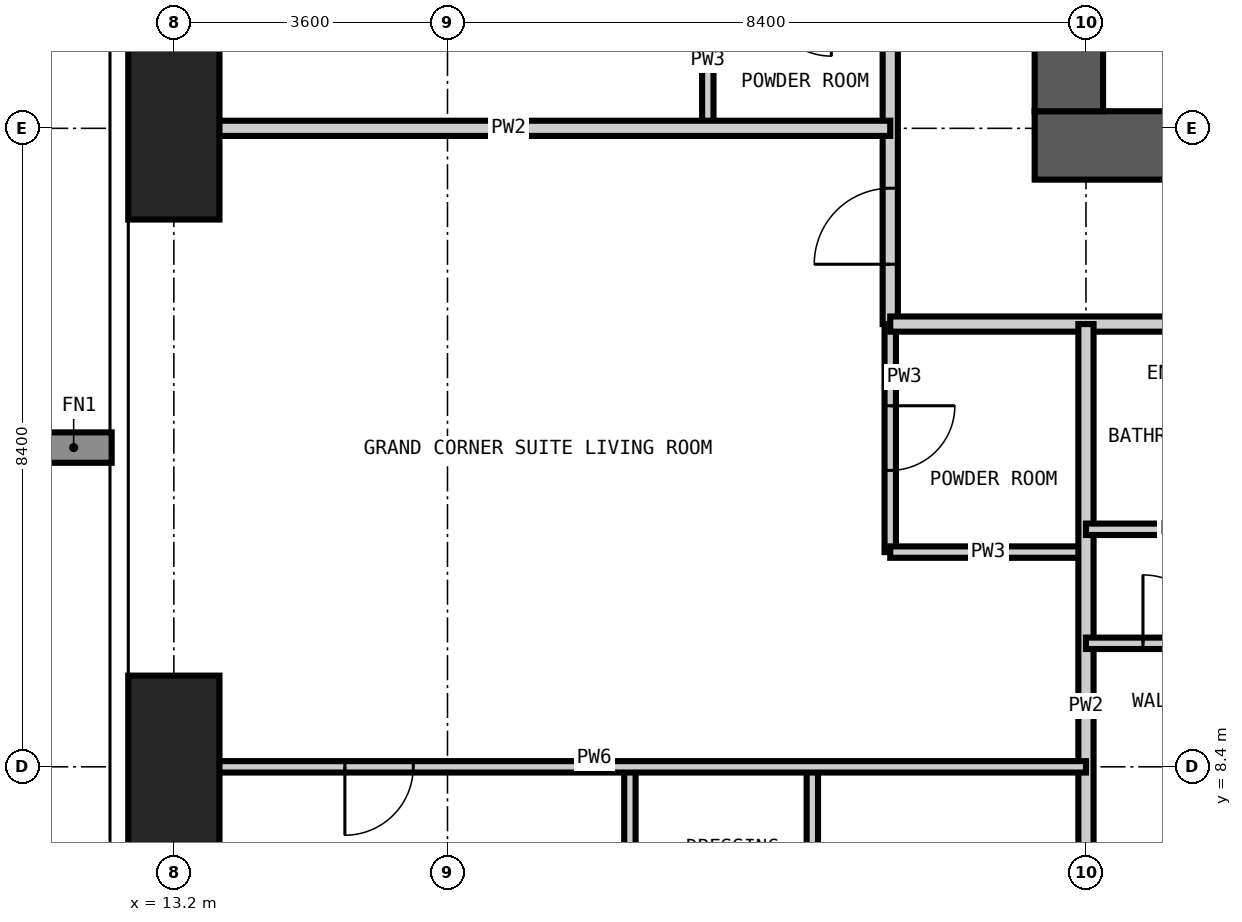
"""IFC4 building model, lengths in metres.
Left out: names, types, materials, properties, quantities, classifications, styles, units other than length and angle.
Written with IfcOpenShell. Run it as: python <this file> out.ifc"""

import sys

from ifc_helpers import new_model, si_unit, direction, frame, frame_2d, origin, origin_2d, place, context, subcontext, project, spatial, rectangle, extrude, element, fill, save


model = new_model("IFC4")
c1 = context("Model", 3, precision=1e-05, world=origin(), true_north=direction((0.0, 1.0)))
c2 = subcontext(c1, "Body", "Model", "MODEL_VIEW")
j1 = project(units=[si_unit("LENGTHUNIT", "METRE"), si_unit("PLANEANGLEUNIT", "RADIAN")], contexts=[c1])
p1 = place(None, origin())
s1 = spatial("IfcSite", under=j1, at=p1, CompositionType="ELEMENT")
p2 = place(p1, origin())
s2 = spatial("IfcBuilding", under=s1, at=p2, CompositionType="ELEMENT")
p3 = place(p2, frame((0.0, 0.0, 233.4)))
s3 = spatial("IfcBuildingStorey", under=s2, at=p3, CompositionType="ELEMENT", Elevation=233.4)
for number, where, z_axis, x_axis in (
    (1, (13.2, 8.4, -0.35), (0.0, 0.0, 1.0), (1.0, 0.0, 0.0)),
    (2, (13.2, 16.8, -0.35), (0.0, 0.0, 1.0), (1.0, 0.0, 0.0)),
):
    element("IfcColumn", number, at=place(p3, frame(where, z_axis=z_axis, x_axis=x_axis)), inside=s3, PredefinedType="COLUMN", context=c2, shape_type="SweptSolid", body=[
        extrude(rectangle(XDim=1.2, YDim=2.4, at=origin_2d()), origin(), (0.0, 0.0, 1.0), 3.9),
    ])
p4 = place(p3, frame((24.525, 16.575, -0.35), z_axis=(0.0, 0.0, 1.0), x_axis=(1.0, 0.0, 0.0)))
e3 = element("IfcWall", 3, at=p4, inside=s3, PredefinedType="SHEAR", context=c2, shape_type="SweptSolid", body=[
    extrude(rectangle(XDim=18.15, YDim=0.9, at=frame_2d((9.075, 0.0))), origin(), (0.0, 0.0, 1.0), 3.9),
])
p5 = place(p4, frame((4.375, 0.0, 0.35)))
e4 = element("IfcOpeningElement", 4, at=p5, cuts=e3, PredefinedType="OPENING", context=c2, shape_type="SweptSolid", body=[
    extrude(rectangle(XDim=1.0, YDim=2.1, at=frame_2d((0.5, 1.05))), frame((0.0, 0.46, 0.0), z_axis=(0.0, -1.0, 0.0), x_axis=(1.0, 0.0, 0.0)), (0.0, 0.0, 1.0), 0.92),
])
p6 = place(p4, frame((10.675, 0.0, 0.35)))
e5 = element("IfcOpeningElement", 5, at=p6, cuts=e3, PredefinedType="OPENING", context=c2, shape_type="SweptSolid", body=[
    extrude(rectangle(XDim=1.0, YDim=2.1, at=frame_2d((0.5, 1.05))), frame((0.0, 0.46, 0.0), z_axis=(0.0, -1.0, 0.0), x_axis=(1.0, 0.0, 0.0)), (0.0, 0.0, 1.0), 0.92),
])
p7 = place(p3, frame((24.975, 41.775, -0.35), z_axis=(0.0, 0.0, 1.0), x_axis=(0.0, -1.0, 0.0)))
e6 = element("IfcWall", 6, at=p7, inside=s3, PredefinedType="SHEAR", context=c2, shape_type="SweptSolid", body=[
    extrude(rectangle(XDim=24.75, YDim=0.9, at=frame_2d((12.375, 0.0))), origin(), (0.0, 0.0, 1.0), 3.9),
])
p8 = place(p7, frame((11.875, 0.0, 0.35)))
e7 = element("IfcOpeningElement", 7, at=p8, cuts=e6, PredefinedType="OPENING", context=c2, shape_type="SweptSolid", body=[
    extrude(rectangle(XDim=1.0, YDim=2.1, at=frame_2d((0.5, 1.05))), frame((0.0, 0.46, 0.0), z_axis=(0.0, -1.0, 0.0), x_axis=(1.0, 0.0, 0.0)), (0.0, 0.0, 1.0), 0.92),
])
p9 = place(p3, frame((20.225, 16.8, 0.0), z_axis=(0.0, 0.0, 1.0), x_axis=(0.0, 1.0, 0.0)))
e8 = element("IfcWall", 8, at=p9, inside=s3, PredefinedType="PARTITIONING", context=c2, shape_type="SweptSolid", body=[
    extrude(rectangle(XDim=1.8, YDim=0.15, at=frame_2d((0.9, 0.0))), origin(), (0.0, 0.0, 1.0), 3.55),
])
p10 = place(p3, frame((22.625, 11.225, 0.0), z_axis=(0.0, 0.0, 1.0), x_axis=(0.0, 1.0, 0.0)))
e9 = element("IfcWall", 9, at=p10, inside=s3, PredefinedType="PARTITIONING", context=c2, shape_type="SweptSolid", body=[
    extrude(rectangle(XDim=3.0, YDim=0.15, at=frame_2d((1.5, 0.0))), origin(), (0.0, 0.0, 1.0), 3.55),
])
p11 = place(p10, frame((1.075, 0.0, 0.0)))
e10 = element("IfcOpeningElement", 10, at=p11, cuts=e9, PredefinedType="OPENING", context=c2, shape_type="SweptSolid", body=[
    extrude(rectangle(XDim=0.85, YDim=2.1, at=frame_2d((0.425, 1.05))), frame((0.0, 0.085, 0.0), z_axis=(0.0, -1.0, 0.0), x_axis=(1.0, 0.0, 0.0)), (0.0, 0.0, 1.0), 0.17),
])
p12 = place(p3, frame((22.625, 11.225, 0.0), z_axis=(0.0, 0.0, 1.0), x_axis=(1.0, 0.0, 0.0)))
e11 = element("IfcWall", 11, at=p12, inside=s3, PredefinedType="PARTITIONING", context=c2, shape_type="SweptSolid", body=[
    extrude(rectangle(XDim=2.575, YDim=0.15, at=frame_2d((1.288, 0.0))), origin(), (0.0, 0.0, 1.0), 3.55),
])
p13 = place(p3, frame((22.625, 14.225, 0.0), z_axis=(0.0, 0.0, 1.0), x_axis=(0.0, 1.0, 0.0)))
e12 = element("IfcWall", 12, at=p13, inside=s3, PredefinedType="PARTITIONING", context=c2, shape_type="SweptSolid", body=[
    extrude(rectangle(XDim=30.95, YDim=0.2, at=frame_2d((15.475, 0.0))), origin(), (0.0, 0.0, 1.0), 3.55),
])
p14 = place(p13, frame((5.075, 0.0, 0.0)))
e13 = element("IfcOpeningElement", 13, at=p14, cuts=e12, PredefinedType="OPENING", context=c2, shape_type="SweptSolid", body=[
    extrude(rectangle(XDim=1.0, YDim=2.2, at=frame_2d((0.5, 1.1))), frame((0.0, 0.11, 0.0), z_axis=(0.0, -1.0, 0.0), x_axis=(1.0, 0.0, 0.0)), (0.0, 0.0, 1.0), 0.22),
])
p15 = place(p13, frame((13.475, 0.0, 0.0)))
e14 = element("IfcOpeningElement", 14, at=p15, cuts=e12, PredefinedType="OPENING", context=c2, shape_type="SweptSolid", body=[
    extrude(rectangle(XDim=1.0, YDim=2.2, at=frame_2d((0.5, 1.1))), frame((0.0, 0.11, 0.0), z_axis=(0.0, -1.0, 0.0), x_axis=(1.0, 0.0, 0.0)), (0.0, 0.0, 1.0), 0.22),
])
p16 = place(p13, frame((21.875, 0.0, 0.0)))
e15 = element("IfcOpeningElement", 15, at=p16, cuts=e12, PredefinedType="OPENING", context=c2, shape_type="SweptSolid", body=[
    extrude(rectangle(XDim=1.0, YDim=2.2, at=frame_2d((0.5, 1.1))), frame((0.0, 0.11, 0.0), z_axis=(0.0, -1.0, 0.0), x_axis=(1.0, 0.0, 0.0)), (0.0, 0.0, 1.0), 0.22),
])
p17 = place(p13, frame((0.787, 0.0, 0.0)))
e16 = element("IfcOpeningElement", 16, at=p17, cuts=e12, PredefinedType="OPENING", context=c2, shape_type="SweptSolid", body=[
    extrude(rectangle(XDim=1.0, YDim=2.2, at=frame_2d((0.5, 1.1))), frame((0.0, 0.11, 0.0), z_axis=(0.0, -1.0, 0.0), x_axis=(1.0, 0.0, 0.0)), (0.0, 0.0, 1.0), 0.22),
])
p18 = place(p13, frame((28.862, 0.0, 0.0)))
e17 = element("IfcOpeningElement", 17, at=p18, cuts=e12, PredefinedType="OPENING", context=c2, shape_type="SweptSolid", body=[
    extrude(rectangle(XDim=1.0, YDim=2.2, at=frame_2d((0.5, 1.1))), frame((0.0, 0.11, 0.0), z_axis=(0.0, -1.0, 0.0), x_axis=(1.0, 0.0, 0.0)), (0.0, 0.0, 1.0), 0.22),
])
p19 = place(p3, frame((44.875, 14.225, 0.0), z_axis=(0.0, 0.0, 1.0), x_axis=(-1.0, 0.0, 0.0)))
e18 = element("IfcWall", 18, at=p19, inside=s3, PredefinedType="PARTITIONING", context=c2, shape_type="SweptSolid", body=[
    extrude(rectangle(XDim=22.25, YDim=0.2, at=frame_2d((11.125, 0.0))), origin(), (0.0, 0.0, 1.0), 3.55),
])
p20 = place(p19, frame((15.875, 0.0, 0.0)))
e19 = element("IfcOpeningElement", 19, at=p20, cuts=e18, PredefinedType="OPENING", context=c2, shape_type="SweptSolid", body=[
    extrude(rectangle(XDim=1.0, YDim=2.2, at=frame_2d((0.5, 1.1))), frame((0.0, 0.11, 0.0), z_axis=(0.0, -1.0, 0.0), x_axis=(1.0, 0.0, 0.0)), (0.0, 0.0, 1.0), 0.22),
])
p21 = place(p19, frame((9.425, 0.0, 0.0)))
e20 = element("IfcOpeningElement", 20, at=p21, cuts=e18, PredefinedType="OPENING", context=c2, shape_type="SweptSolid", body=[
    extrude(rectangle(XDim=1.0, YDim=2.2, at=frame_2d((0.5, 1.1))), frame((0.0, 0.11, 0.0), z_axis=(0.0, -1.0, 0.0), x_axis=(1.0, 0.0, 0.0)), (0.0, 0.0, 1.0), 0.22),
])
p22 = place(p19, frame((5.675, 0.0, 0.0)))
e21 = element("IfcOpeningElement", 21, at=p22, cuts=e18, PredefinedType="OPENING", context=c2, shape_type="SweptSolid", body=[
    extrude(rectangle(XDim=1.0, YDim=2.2, at=frame_2d((0.5, 1.1))), frame((0.0, 0.11, 0.0), z_axis=(0.0, -1.0, 0.0), x_axis=(1.0, 0.0, 0.0)), (0.0, 0.0, 1.0), 0.22),
])
p23 = place(p3, frame((25.2, 4.182, 0.0), z_axis=(0.0, 0.0, 1.0), x_axis=(0.0, 1.0, 0.0)))
e22 = element("IfcWall", 22, at=p23, inside=s3, PredefinedType="PARTITIONING", context=c2, shape_type="SweptSolid", body=[
    extrude(rectangle(XDim=10.043, YDim=0.2, at=frame_2d((5.021, 0.0))), origin(), (0.0, 0.0, 1.0), 3.55),
])
p24 = place(p3, frame((12.582, 16.8, 0.0), z_axis=(0.0, 0.0, 1.0), x_axis=(1.0, 0.0, 0.0)))
e23 = element("IfcWall", 23, at=p24, inside=s3, PredefinedType="PARTITIONING", context=c2, shape_type="SweptSolid", body=[
    extrude(rectangle(XDim=10.043, YDim=0.2, at=frame_2d((5.021, 0.0))), origin(), (0.0, 0.0, 1.0), 3.55),
])
p25 = place(p3, frame((19.2, 5.4, 0.0), z_axis=(0.0, 0.0, 1.0), x_axis=(0.0, 1.0, 0.0)))
e24 = element("IfcWall", 24, at=p25, inside=s3, PredefinedType="PARTITIONING", context=c2, shape_type="SweptSolid", body=[
    extrude(rectangle(XDim=3.0, YDim=0.15, at=frame_2d((1.5, 0.0))), origin(), (0.0, 0.0, 1.0), 3.55),
])
p26 = place(p25, frame((1.05, 0.0, 0.0)))
e25 = element("IfcOpeningElement", 25, at=p26, cuts=e24, PredefinedType="OPENING", context=c2, shape_type="SweptSolid", body=[
    extrude(rectangle(XDim=0.9, YDim=2.1, at=frame_2d((0.45, 1.05))), frame((0.0, 0.085, 0.0), z_axis=(0.0, -1.0, 0.0), x_axis=(1.0, 0.0, 0.0)), (0.0, 0.0, 1.0), 0.17),
])
p27 = place(p3, frame((21.6, 5.4, 0.0), z_axis=(0.0, 0.0, 1.0), x_axis=(0.0, 1.0, 0.0)))
e26 = element("IfcWall", 26, at=p27, inside=s3, PredefinedType="PARTITIONING", context=c2, shape_type="SweptSolid", body=[
    extrude(rectangle(XDim=3.0, YDim=0.15, at=frame_2d((1.5, 0.0))), origin(), (0.0, 0.0, 1.0), 3.55),
])
p28 = place(p3, frame((12.582, 8.4, 0.0), z_axis=(0.0, 0.0, 1.0), x_axis=(1.0, 0.0, 0.0)))
e27 = element("IfcWall", 27, at=p28, inside=s3, PredefinedType="PARTITIONING", context=c2, shape_type="SweptSolid", body=[
    extrude(rectangle(XDim=12.618, YDim=0.15, at=frame_2d((6.309, 0.0))), origin(), (0.0, 0.0, 1.0), 3.55),
])
p29 = place(p28, frame((2.868, 0.0, 0.0)))
e28 = element("IfcOpeningElement", 28, at=p29, cuts=e27, PredefinedType="OPENING", context=c2, shape_type="SweptSolid", body=[
    extrude(rectangle(XDim=0.9, YDim=2.1, at=frame_2d((0.45, 1.05))), frame((0.0, 0.085, 0.0), z_axis=(0.0, -1.0, 0.0), x_axis=(1.0, 0.0, 0.0)), (0.0, 0.0, 1.0), 0.17),
])
p30 = place(p3, frame((25.2, 10.025, 0.0), z_axis=(0.0, 0.0, 1.0), x_axis=(1.0, 0.0, 0.0)))
e29 = element("IfcWall", 29, at=p30, inside=s3, PredefinedType="PARTITIONING", context=c2, shape_type="SweptSolid", body=[
    extrude(rectangle(XDim=2.4, YDim=0.15, at=frame_2d((1.2, 0.0))), origin(), (0.0, 0.0, 1.0), 3.55),
])
p31 = place(p30, frame((0.75, 0.0, 0.0)))
e30 = element("IfcOpeningElement", 30, at=p31, cuts=e29, PredefinedType="OPENING", context=c2, shape_type="SweptSolid", body=[
    extrude(rectangle(XDim=0.9, YDim=2.1, at=frame_2d((0.45, 1.05))), frame((0.0, 0.085, 0.0), z_axis=(0.0, -1.0, 0.0), x_axis=(1.0, 0.0, 0.0)), (0.0, 0.0, 1.0), 0.17),
])
p32 = place(p3, frame((25.2, 11.525, 0.0), z_axis=(0.0, 0.0, 1.0), x_axis=(1.0, 0.0, 0.0)))
e31 = element("IfcWall", 31, at=p32, inside=s3, PredefinedType="PARTITIONING", context=c2, shape_type="SweptSolid", body=[
    extrude(rectangle(XDim=2.4, YDim=0.15, at=frame_2d((1.2, 0.0))), origin(), (0.0, 0.0, 1.0), 3.55),
])
p33 = place(p31, origin())
e32 = element("IfcDoor", 32, at=p33, inside=s3, OperationType="SINGLE_SWING_LEFT", PredefinedType="DOOR", context=c2, shape_type="SweptSolid", body=[
    extrude(rectangle(XDim=0.9, YDim=2.1, at=frame_2d((0.45, 1.05))), frame((0.0, 0.025, 0.0), z_axis=(0.0, -1.0, 0.0), x_axis=(1.0, 0.0, 0.0)), (0.0, 0.0, 1.0), 0.05),
])
fill(e30, e32)
p34 = place(p17, origin())
e33 = element("IfcDoor", 33, at=p34, inside=s3, OperationType="SINGLE_SWING_LEFT", PredefinedType="DOOR", context=c2, shape_type="SweptSolid", body=[
    extrude(rectangle(XDim=1.0, YDim=2.2, at=frame_2d((0.5, 1.1))), frame((0.0, 0.025, 0.0), z_axis=(0.0, -1.0, 0.0), x_axis=(1.0, 0.0, 0.0)), (0.0, 0.0, 1.0), 0.05),
])
fill(e16, e33)
p35 = place(p11, frame((0.85, 0.0, 0.0), z_axis=(0.0, 0.0, 1.0), x_axis=(-1.0, 0.0, 0.0)))
e34 = element("IfcDoor", 34, at=p35, inside=s3, OperationType="SINGLE_SWING_LEFT", PredefinedType="DOOR", context=c2, shape_type="SweptSolid", body=[
    extrude(rectangle(XDim=0.85, YDim=2.1, at=frame_2d((0.425, 1.05))), frame((0.0, 0.025, 0.0), z_axis=(0.0, -1.0, 0.0), x_axis=(1.0, 0.0, 0.0)), (0.0, 0.0, 1.0), 0.05),
])
fill(e10, e34)
p36 = place(p29, frame((0.9, 0.0, 0.0), z_axis=(0.0, 0.0, 1.0), x_axis=(-1.0, 0.0, 0.0)))
e35 = element("IfcDoor", 35, at=p36, inside=s3, OperationType="SINGLE_SWING_RIGHT", PredefinedType="DOOR", context=c2, shape_type="SweptSolid", body=[
    extrude(rectangle(XDim=0.9, YDim=2.1, at=frame_2d((0.45, 1.05))), frame((0.0, 0.025, 0.0), z_axis=(0.0, -1.0, 0.0), x_axis=(1.0, 0.0, 0.0)), (0.0, 0.0, 1.0), 0.05),
])
fill(e28, e35)
save(model, sys.argv[1])
